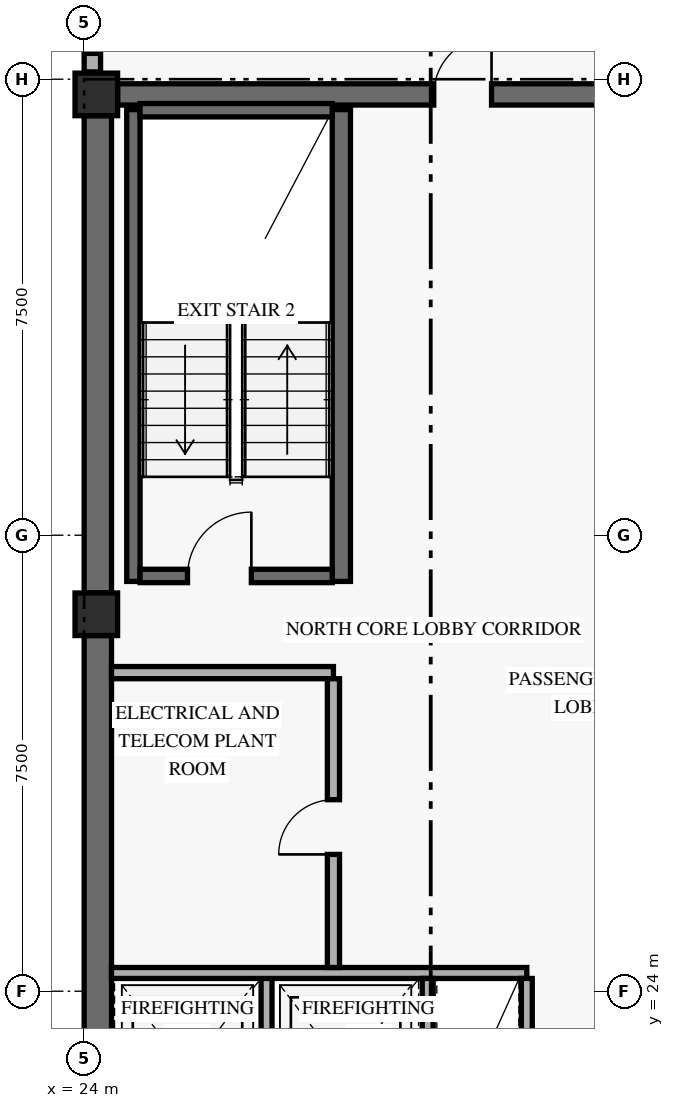
"""IFC4 building model, lengths in metres.
Left out: names, types, materials, properties, quantities, classifications, styles, units other than length and angle.
Written with IfcOpenShell. Run it as: python <this file> out.ifc"""

import sys

from ifc_helpers import new_model, si_unit, direction, frame, frame_2d, origin, origin_2d, place, context, subcontext, project, spatial, rectangle, extrude, element, fill, save


model = new_model("IFC4")
c1 = context("Model", 3, precision=1e-05, world=origin(), true_north=direction((0.0, 1.0)))
c2 = subcontext(c1, "Body", "Model", "MODEL_VIEW")
j1 = project(units=[si_unit("LENGTHUNIT", "METRE"), si_unit("PLANEANGLEUNIT", "RADIAN")], contexts=[c1])
p1 = place(None, origin())
s1 = spatial("IfcSite", under=j1, at=p1, CompositionType="ELEMENT")
p2 = place(p1, origin())
s2 = spatial("IfcBuilding", under=s1, at=p2, CompositionType="ELEMENT")
p3 = place(p2, frame((0.0, 0.0, 238.8)))
s3 = spatial("IfcBuildingStorey", under=s2, at=p3, CompositionType="ELEMENT", Elevation=238.8)
p4 = place(p3, frame((24.225, 17.9, 0.0), z_axis=(0.0, 0.0, 1.0), x_axis=(0.0, 1.0, 0.0)))
e1 = element("IfcWall", 1, at=p4, inside=s3, PredefinedType="SHEAR", context=c2, shape_type="SweptSolid", body=[
    extrude(rectangle(XDim=11.95, YDim=0.45, at=frame_2d((5.975, 0.0))), origin(), (0.0, 0.0, 1.0), 2.821),
])
p5 = place(p3, frame((24.225, 30.55, 0.0), z_axis=(0.0, 0.0, 1.0), x_axis=(0.0, 1.0, 0.0)))
e2 = element("IfcWall", 2, at=p5, inside=s3, PredefinedType="SHEAR", context=c2, shape_type="SweptSolid", body=[
    extrude(rectangle(XDim=7.85, YDim=0.45, at=frame_2d((3.925, 0.0))), origin(), (0.0, 0.0, 1.0), 2.821),
])
p6 = place(p3, frame((24.55, 38.75, 0.0), z_axis=(0.0, 0.0, 1.0), x_axis=(1.0, 0.0, 0.0)))
e3 = element("IfcWall", 3, at=p6, inside=s3, PredefinedType="SHEAR", context=c2, shape_type="SweptSolid", body=[
    extrude(rectangle(XDim=10.3, YDim=0.35, at=frame_2d((5.15, 0.0))), origin(), (0.0, 0.0, 1.0), 3.36),
])
p7 = place(p6, frame((5.2, 0.0, 0.0)))
e4 = element("IfcOpeningElement", 4, at=p7, cuts=e3, PredefinedType="OPENING", context=c2, shape_type="SweptSolid", body=[
    extrude(rectangle(XDim=0.95, YDim=2.15, at=frame_2d((0.475, 1.075))), frame((0.0, 0.185, 0.0), z_axis=(0.0, -1.0, 0.0), x_axis=(1.0, 0.0, 0.0)), (0.0, 0.0, 1.0), 0.37),
])
p8 = place(p3, frame((24.81, 30.74, 0.0), z_axis=(0.0, 0.0, 1.0), x_axis=(0.0, 1.0, 0.0)))
e5 = element("IfcWall", 5, at=p8, inside=s3, PredefinedType="SHEAR", context=c2, shape_type="SweptSolid", body=[
    extrude(rectangle(XDim=7.76, YDim=0.22, at=frame_2d((3.88, 0.0))), origin(), (0.0, 0.0, 1.0), 3.36),
])
p9 = place(p3, frame((28.23, 30.74, 0.0), z_axis=(0.0, 0.0, 1.0), x_axis=(0.0, 1.0, 0.0)))
e6 = element("IfcWall", 6, at=p9, inside=s3, PredefinedType="SHEAR", context=c2, shape_type="SweptSolid", body=[
    extrude(rectangle(XDim=7.76, YDim=0.3, at=frame_2d((3.88, 0.0))), origin(), (0.0, 0.0, 1.0), 3.36),
])
p10 = place(p3, frame((24.92, 30.83, 0.0), z_axis=(0.0, 0.0, 1.0), x_axis=(1.0, 0.0, 0.0)))
e7 = element("IfcWall", 7, at=p10, inside=s3, PredefinedType="SHEAR", context=c2, shape_type="SweptSolid", body=[
    extrude(rectangle(XDim=3.16, YDim=0.22, at=frame_2d((1.58, 0.0))), origin(), (0.0, 0.0, 1.0), 3.36),
])
p11 = place(p10, frame((0.78, 0.0, 0.0)))
e8 = element("IfcOpeningElement", 8, at=p11, cuts=e7, PredefinedType="OPENING", context=c2, shape_type="SweptSolid", body=[
    extrude(rectangle(XDim=1.05, YDim=2.15, at=frame_2d((0.525, 1.075))), frame((0.0, 0.12, 0.0), z_axis=(0.0, -1.0, 0.0), x_axis=(1.0, 0.0, 0.0)), (0.0, 0.0, 1.0), 0.24),
])
p12 = place(p3, frame((24.92, 38.49, 0.0), z_axis=(0.0, 0.0, 1.0), x_axis=(1.0, 0.0, 0.0)))
e9 = element("IfcWall", 9, at=p12, inside=s3, PredefinedType="SHEAR", context=c2, shape_type="SweptSolid", body=[
    extrude(rectangle(XDim=3.16, YDim=0.22, at=frame_2d((1.58, 0.0))), origin(), (0.0, 0.0, 1.0), 3.36),
])
for number, where, z_axis, x_axis in (
    (10, (24.2, 30.2, 0.0), (0.0, 0.0, 1.0), (1.0, 0.0, 0.0)),
    (11, (24.2, 38.75, 0.0), (0.0, 0.0, 1.0), (1.0, 0.0, 0.0)),
):
    element("IfcColumn", number, at=place(p3, frame(where, z_axis=z_axis, x_axis=x_axis)), inside=s3, PredefinedType="COLUMN", context=c2, shape_type="SweptSolid", body=[
        extrude(rectangle(XDim=0.7, YDim=0.7, at=origin_2d()), origin(), (0.0, 0.0, 1.0), 3.6),
    ])
p13 = place(p3, frame((24.135, 39.12, 0.0), z_axis=(0.0, 0.0, 1.0), x_axis=(0.0, 1.0, 0.0)))
e12 = element("IfcWall", 12, at=p13, inside=s3, PredefinedType="SOLIDWALL", context=c2, shape_type="SweptSolid", body=[
    extrude(rectangle(XDim=1.56, YDim=0.27, at=frame_2d((0.78, 0.0))), origin(), (0.0, 0.0, 1.0), 2.803),
])
p14 = place(p13, frame((0.305, 0.0, 0.85)))
e13 = element("IfcOpeningElement", 13, at=p14, cuts=e12, PredefinedType="OPENING", context=c2, shape_type="SweptSolid", body=[
    extrude(rectangle(XDim=0.95, YDim=1.5, at=frame_2d((0.475, 0.75))), frame((0.0, 0.145, 0.0), z_axis=(0.0, -1.0, 0.0), x_axis=(1.0, 0.0, 0.0)), (0.0, 0.0, 1.0), 0.29),
])
p15 = place(p3, frame((27.0, 21.19, 0.0), z_axis=(0.0, 0.0, 1.0), x_axis=(0.0, 1.0, 0.0)))
e14 = element("IfcWall", 14, at=p15, inside=s3, PredefinedType="STANDARD", context=c2, shape_type="SweptSolid", body=[
    extrude(rectangle(XDim=3.11, YDim=0.18, at=frame_2d((1.555, 0.0))), origin(), (0.0, 0.0, 1.0), 3.36),
])
p16 = place(p3, frame((24.45, 24.3, 0.0), z_axis=(0.0, 0.0, 1.0), x_axis=(1.0, 0.0, 0.0)))
e15 = element("IfcWall", 15, at=p16, inside=s3, PredefinedType="STANDARD", context=c2, shape_type="SweptSolid", body=[
    extrude(rectangle(XDim=6.83, YDim=0.18, at=frame_2d((3.415, 0.0))), origin(), (0.0, 0.0, 1.0), 3.36),
])
for number, where, z_axis, x_axis in (
    (16, (29.65, 21.19, 0.0), (0.0, 0.0, 1.0), (0.0, 1.0, 0.0)),
    (17, (31.28, 21.19, 0.0), (0.0, 0.0, 1.0), (0.0, 1.0, 0.0)),
):
    element("IfcWall", number, at=place(p3, frame(where, z_axis=z_axis, x_axis=x_axis)), inside=s3, PredefinedType="STANDARD", context=c2, shape_type="SweptSolid", body=[
        extrude(rectangle(XDim=3.02, YDim=0.18, at=frame_2d((1.51, 0.0))), origin(), (0.0, 0.0, 1.0), 3.36),
    ])
p17 = place(p3, frame((24.45, 29.24, 0.0), z_axis=(0.0, 0.0, 1.0), x_axis=(1.0, 0.0, 0.0)))
e18 = element("IfcWall", 18, at=p17, inside=s3, PredefinedType="STANDARD", context=c2, shape_type="SweptSolid", body=[
    extrude(rectangle(XDim=3.65, YDim=0.2, at=frame_2d((1.825, 0.0))), origin(), (0.0, 0.0, 1.0), 3.36),
])
p18 = place(p3, frame((28.1, 24.39, 0.0), z_axis=(0.0, 0.0, 1.0), x_axis=(0.0, 1.0, 0.0)))
e19 = element("IfcWall", 19, at=p18, inside=s3, PredefinedType="STANDARD", context=c2, shape_type="SweptSolid", body=[
    extrude(rectangle(XDim=4.75, YDim=0.2, at=frame_2d((2.375, 0.0))), origin(), (0.0, 0.0, 1.0), 3.36),
])
p19 = place(p18, frame((1.86, 0.0, 0.0)))
e20 = element("IfcOpeningElement", 20, at=p19, cuts=e19, PredefinedType="OPENING", context=c2, shape_type="SweptSolid", body=[
    extrude(rectangle(XDim=0.9, YDim=2.1, at=frame_2d((0.45, 1.05))), frame((0.0, 0.11, 0.0), z_axis=(0.0, -1.0, 0.0), x_axis=(1.0, 0.0, 0.0)), (0.0, 0.0, 1.0), 0.22),
])
p20 = place(p14, origin())
e21 = element("IfcWindow", 21, at=p20, inside=s3, PartitioningType="SINGLE_PANEL", PredefinedType="WINDOW", context=c2, shape_type="SweptSolid", body=[
    extrude(rectangle(XDim=0.95, YDim=1.5, at=frame_2d((0.475, 0.75))), frame((0.0, 0.03, 0.0), z_axis=(0.0, -1.0, 0.0), x_axis=(1.0, 0.0, 0.0)), (0.0, 0.0, 1.0), 0.06),
])
fill(e13, e21)
p21 = place(p11, origin())
e22 = element("IfcDoor", 22, at=p21, inside=s3, OperationType="SINGLE_SWING_RIGHT", PredefinedType="DOOR", context=c2, shape_type="SweptSolid", body=[
    extrude(rectangle(XDim=1.05, YDim=2.15, at=frame_2d((0.525, 1.075))), frame((0.0, 0.025, 0.0), z_axis=(0.0, -1.0, 0.0), x_axis=(1.0, 0.0, 0.0)), (0.0, 0.0, 1.0), 0.05),
])
fill(e8, e22)
p22 = place(p19, origin())
e23 = element("IfcDoor", 23, at=p22, inside=s3, OperationType="SINGLE_SWING_LEFT", PredefinedType="DOOR", context=c2, shape_type="SweptSolid", body=[
    extrude(rectangle(XDim=0.9, YDim=2.1, at=frame_2d((0.45, 1.05))), frame((0.0, 0.025, 0.0), z_axis=(0.0, -1.0, 0.0), x_axis=(1.0, 0.0, 0.0)), (0.0, 0.0, 1.0), 0.05),
])
fill(e20, e23)
p23 = place(p7, origin())
e24 = element("IfcDoor", 24, at=p23, inside=s3, OperationType="SINGLE_SWING_RIGHT", PredefinedType="DOOR", context=c2, shape_type="SweptSolid", body=[
    extrude(rectangle(XDim=0.95, YDim=2.15, at=frame_2d((0.475, 1.075))), frame((0.0, 0.025, 0.0), z_axis=(0.0, -1.0, 0.0), x_axis=(1.0, 0.0, 0.0)), (0.0, 0.0, 1.0), 0.05),
])
fill(e4, e24)
save(model, sys.argv[1])
